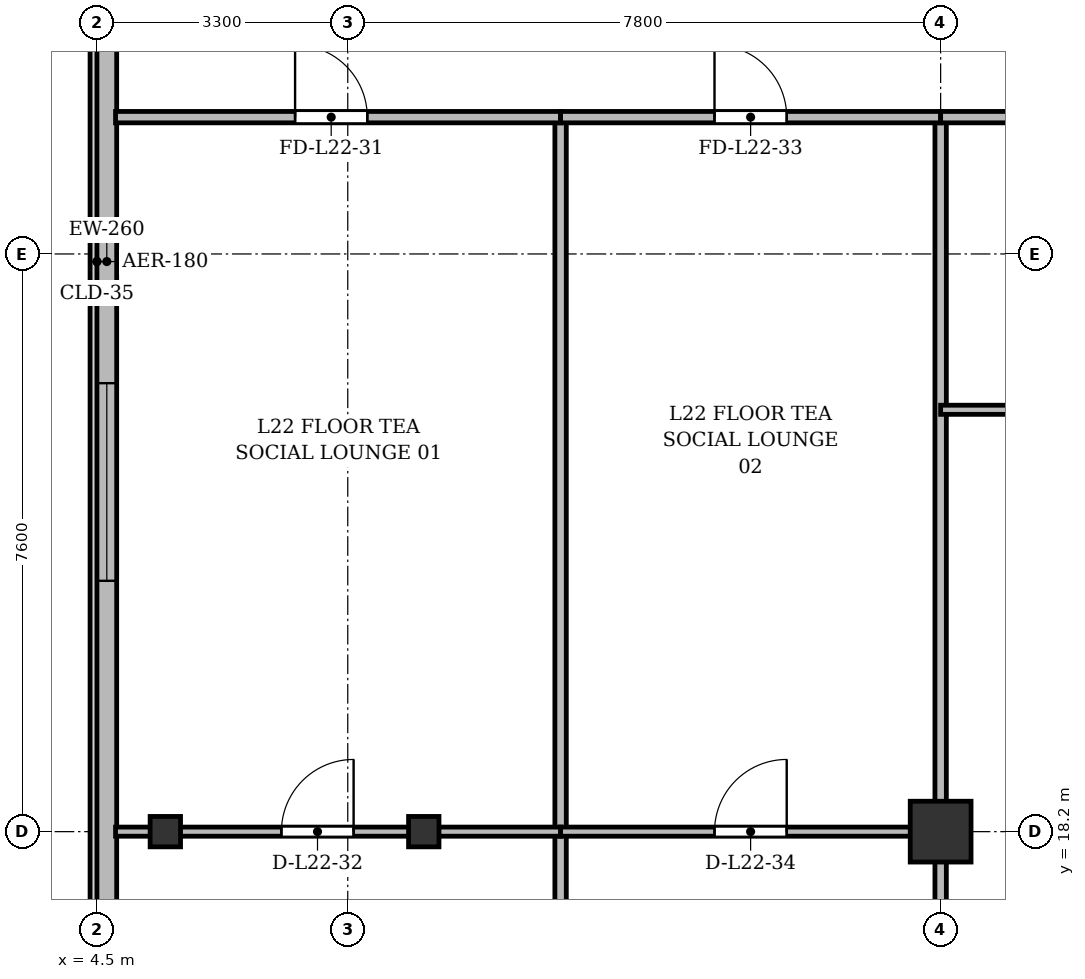
"""IFC4 building model, lengths in metres.
Left out: names, types, materials, properties, quantities, classifications, styles, units other than length and angle.
Written with IfcOpenShell. Run it as: python <this file> out.ifc"""

import sys

from ifc_helpers import new_model, si_unit, direction, frame, frame_2d, origin, origin_2d, place, context, subcontext, project, spatial, rectangle, i_section, extrude, source, transform, mapped, element, fill, save


model = new_model("IFC4")
c1 = context("Model", 3, precision=1e-05, world=origin(), true_north=direction((0.0, 1.0)))
c2 = subcontext(c1, "Body", "Model", "MODEL_VIEW")
j1 = project(units=[si_unit("LENGTHUNIT", "METRE"), si_unit("PLANEANGLEUNIT", "RADIAN")], contexts=[c1])
p1 = place(None, origin())
s1 = spatial("IfcSite", under=j1, at=p1, CompositionType="ELEMENT")
p2 = place(p1, origin())
s2 = spatial("IfcBuilding", under=s1, at=p2, CompositionType="ELEMENT")
p3 = place(p2, frame((0.0, 0.0, 88.9)))
s3 = spatial("IfcBuildingStorey", under=s2, at=p3, CompositionType="ELEMENT", Elevation=88.9)
m1 = source(origin(), c2, "Body", "SweptSolid", [
    extrude(i_section(OverallWidth=0.4, OverallDepth=0.4, WebThickness=0.022, FlangeThickness=0.035, at=origin_2d()), origin(), (0.0, 0.0, 1.0), 3.6),
])
for number, where, z_axis, x_axis in (
    (1, (5.4, 18.2, 0.0), (0.0, 0.0, 1.0), (1.0, 0.0, 0.0)),
    (2, (8.8, 18.2, 0.0), (0.0, 0.0, 1.0), (1.0, 0.0, 0.0)),
):
    element("IfcColumn", number, at=place(p3, frame(where, z_axis=z_axis, x_axis=x_axis)), inside=s3, PredefinedType="COLUMN", context=c2, shape_type="MappedRepresentation", body=[
        mapped(m1, transform((0.0, 0.0, 0.0), x_axis=(1.0, 0.0, 0.0), y_axis=(0.0, 1.0, 0.0), z_axis=(0.0, 0.0, 1.0), scale=1.0)),
    ])
m2 = source(origin(), c2, "Body", "SweptSolid", [
    extrude(rectangle(XDim=0.8, YDim=0.8, at=origin_2d()), origin(), (0.0, 0.0, 1.0), 3.6),
])
p4 = place(p3, frame((15.6, 18.2, 0.0), z_axis=(0.0, 0.0, 1.0), x_axis=(1.0, 0.0, 0.0)))
e3 = element("IfcColumn", 3, at=p4, inside=s3, PredefinedType="COLUMN", context=c2, shape_type="MappedRepresentation", body=[
    mapped(m2, transform((0.0, 0.0, 0.0), x_axis=(1.0, 0.0, 0.0), y_axis=(0.0, 1.0, 0.0), z_axis=(0.0, 0.0, 1.0), scale=1.0)),
])
p5 = place(p3, frame((4.63, 5.9, 0.0), z_axis=(0.0, 0.0, 1.0), x_axis=(0.0, 1.0, 0.0)))
e4 = element("IfcWall", 4, at=p5, inside=s3, PredefinedType="SOLIDWALL", context=c2, shape_type="SweptSolid", body=[
    extrude(rectangle(XDim=39.6, YDim=0.26, at=frame_2d((19.8, 0.0))), origin(), (0.0, 0.0, 1.0), 3.34),
])
p6 = place(p5, frame((1.45, 0.0, 0.92)))
e5 = element("IfcOpeningElement", 5, at=p6, cuts=e4, PredefinedType="OPENING", context=c2, shape_type="SweptSolid", body=[
    extrude(rectangle(XDim=1.2, YDim=1.65, at=frame_2d((0.6, 0.825))), frame((0.0, 0.14, 0.0), z_axis=(0.0, -1.0, 0.0), x_axis=(1.0, 0.0, 0.0)), (0.0, 0.0, 1.0), 0.28),
])
p7 = place(p5, frame((4.2, 0.0, 0.92)))
e6 = element("IfcOpeningElement", 6, at=p7, cuts=e4, PredefinedType="OPENING", context=c2, shape_type="SweptSolid", body=[
    extrude(rectangle(XDim=2.6, YDim=1.9, at=frame_2d((1.3, 0.95))), frame((0.0, 0.14, 0.0), z_axis=(0.0, -1.0, 0.0), x_axis=(1.0, 0.0, 0.0)), (0.0, 0.0, 1.0), 0.28),
])
p8 = place(p5, frame((8.4, 0.0, 0.92)))
e7 = element("IfcOpeningElement", 7, at=p8, cuts=e4, PredefinedType="OPENING", context=c2, shape_type="SweptSolid", body=[
    extrude(rectangle(XDim=2.6, YDim=1.9, at=frame_2d((1.3, 0.95))), frame((0.0, 0.14, 0.0), z_axis=(0.0, -1.0, 0.0), x_axis=(1.0, 0.0, 0.0)), (0.0, 0.0, 1.0), 0.28),
])
p9 = place(p5, frame((15.6, 0.0, 0.92)))
e8 = element("IfcOpeningElement", 8, at=p9, cuts=e4, PredefinedType="OPENING", context=c2, shape_type="SweptSolid", body=[
    extrude(rectangle(XDim=2.6, YDim=1.9, at=frame_2d((1.3, 0.95))), frame((0.0, 0.14, 0.0), z_axis=(0.0, -1.0, 0.0), x_axis=(1.0, 0.0, 0.0)), (0.0, 0.0, 1.0), 0.28),
])
p10 = place(p5, frame((29.6, 0.0, 0.92)))
e9 = element("IfcOpeningElement", 9, at=p10, cuts=e4, PredefinedType="OPENING", context=c2, shape_type="SweptSolid", body=[
    extrude(rectangle(XDim=2.6, YDim=1.9, at=frame_2d((1.3, 0.95))), frame((0.0, 0.14, 0.0), z_axis=(0.0, -1.0, 0.0), x_axis=(1.0, 0.0, 0.0)), (0.0, 0.0, 1.0), 0.28),
])
p11 = place(p5, frame((37.25, 0.0, 0.92)))
e10 = element("IfcOpeningElement", 10, at=p11, cuts=e4, PredefinedType="OPENING", context=c2, shape_type="SweptSolid", body=[
    extrude(rectangle(XDim=1.2, YDim=1.65, at=frame_2d((0.6, 0.825))), frame((0.0, 0.14, 0.0), z_axis=(0.0, -1.0, 0.0), x_axis=(1.0, 0.0, 0.0)), (0.0, 0.0, 1.0), 0.28),
])
p12 = place(p3, frame((10.6, 3.145, 0.0), z_axis=(0.0, 0.0, 1.0), x_axis=(0.0, 1.0, 0.0)))
e11 = element("IfcWall", 11, at=p12, inside=s3, PredefinedType="PARTITIONING", context=c2, shape_type="SweptSolid", body=[
    extrude(rectangle(XDim=24.455, YDim=0.15, at=frame_2d((12.228, 0.0))), origin(), (0.0, 0.0, 1.0), 2.752),
])
p13 = place(p3, frame((15.6, 3.145, 0.0), z_axis=(0.0, 0.0, 1.0), x_axis=(0.0, 1.0, 0.0)))
e12 = element("IfcWall", 12, at=p13, inside=s3, PredefinedType="PARTITIONING", context=c2, shape_type="SweptSolid", body=[
    extrude(rectangle(XDim=24.455, YDim=0.15, at=frame_2d((12.228, 0.0))), origin(), (0.0, 0.0, 1.0), 2.84),
])
p14 = place(p3, frame((4.745, 27.6, 0.0), z_axis=(0.0, 0.0, 1.0), x_axis=(1.0, 0.0, 0.0)))
e13 = element("IfcWall", 13, at=p14, inside=s3, PredefinedType="PARTITIONING", context=c2, shape_type="SweptSolid", body=[
    extrude(rectangle(XDim=5.855, YDim=0.15, at=frame_2d((2.927, 0.0))), origin(), (0.0, 0.0, 1.0), 2.84),
])
p15 = place(p14, frame((2.362, 0.0, 0.0)))
e14 = element("IfcOpeningElement", 14, at=p15, cuts=e13, PredefinedType="OPENING", context=c2, shape_type="SweptSolid", body=[
    extrude(rectangle(XDim=0.95, YDim=2.15, at=frame_2d((0.475, 1.075))), frame((0.0, 0.085, 0.0), z_axis=(0.0, -1.0, 0.0), x_axis=(1.0, 0.0, 0.0)), (0.0, 0.0, 1.0), 0.17),
])
p16 = place(p3, frame((4.745, 18.2, 0.0), z_axis=(0.0, 0.0, 1.0), x_axis=(1.0, 0.0, 0.0)))
e15 = element("IfcWall", 15, at=p16, inside=s3, PredefinedType="PARTITIONING", context=c2, shape_type="SweptSolid", body=[
    extrude(rectangle(XDim=5.855, YDim=0.12, at=frame_2d((2.927, 0.0))), origin(), (0.0, 0.0, 1.0), 2.752),
])
p17 = place(p16, frame((2.182, 0.0, 0.0)))
e16 = element("IfcOpeningElement", 16, at=p17, cuts=e15, PredefinedType="OPENING", context=c2, shape_type="SweptSolid", body=[
    extrude(rectangle(XDim=0.95, YDim=2.15, at=frame_2d((0.475, 1.075))), frame((0.0, 0.07, 0.0), z_axis=(0.0, -1.0, 0.0), x_axis=(1.0, 0.0, 0.0)), (0.0, 0.0, 1.0), 0.14),
])
p18 = place(p3, frame((10.6, 27.6, 0.0), z_axis=(0.0, 0.0, 1.0), x_axis=(1.0, 0.0, 0.0)))
e17 = element("IfcWall", 17, at=p18, inside=s3, PredefinedType="PARTITIONING", context=c2, shape_type="SweptSolid", body=[
    extrude(rectangle(XDim=5.0, YDim=0.15, at=frame_2d((2.5, 0.0))), origin(), (0.0, 0.0, 1.0), 2.84),
])
p19 = place(p18, frame((2.025, 0.0, 0.0)))
e18 = element("IfcOpeningElement", 18, at=p19, cuts=e17, PredefinedType="OPENING", context=c2, shape_type="SweptSolid", body=[
    extrude(rectangle(XDim=0.95, YDim=2.15, at=frame_2d((0.475, 1.075))), frame((0.0, 0.085, 0.0), z_axis=(0.0, -1.0, 0.0), x_axis=(1.0, 0.0, 0.0)), (0.0, 0.0, 1.0), 0.17),
])
p20 = place(p3, frame((10.6, 18.2, 0.0), z_axis=(0.0, 0.0, 1.0), x_axis=(1.0, 0.0, 0.0)))
e19 = element("IfcWall", 19, at=p20, inside=s3, PredefinedType="PARTITIONING", context=c2, shape_type="SweptSolid", body=[
    extrude(rectangle(XDim=5.0, YDim=0.12, at=frame_2d((2.5, 0.0))), origin(), (0.0, 0.0, 1.0), 2.752),
])
p21 = place(p20, frame((2.025, 0.0, 0.0)))
e20 = element("IfcOpeningElement", 20, at=p21, cuts=e19, PredefinedType="OPENING", context=c2, shape_type="SweptSolid", body=[
    extrude(rectangle(XDim=0.95, YDim=2.15, at=frame_2d((0.475, 1.075))), frame((0.0, 0.07, 0.0), z_axis=(0.0, -1.0, 0.0), x_axis=(1.0, 0.0, 0.0)), (0.0, 0.0, 1.0), 0.14),
])
p22 = place(p3, frame((15.6, 27.6, 0.0), z_axis=(0.0, 0.0, 1.0), x_axis=(1.0, 0.0, 0.0)))
e21 = element("IfcWall", 21, at=p22, inside=s3, PredefinedType="PARTITIONING", context=c2, shape_type="SweptSolid", body=[
    extrude(rectangle(XDim=7.8, YDim=0.15, at=frame_2d((3.9, 0.0))), origin(), (0.0, 0.0, 1.0), 2.84),
])
p23 = place(p22, frame((3.333, 0.0, 0.0)))
e22 = element("IfcOpeningElement", 22, at=p23, cuts=e21, PredefinedType="OPENING", context=c2, shape_type="SweptSolid", body=[
    extrude(rectangle(XDim=0.95, YDim=2.15, at=frame_2d((0.475, 1.075))), frame((0.0, 0.085, 0.0), z_axis=(0.0, -1.0, 0.0), x_axis=(1.0, 0.0, 0.0)), (0.0, 0.0, 1.0), 0.17),
])
p24 = place(p3, frame((15.6, 23.75, 0.0), z_axis=(0.0, 0.0, 1.0), x_axis=(1.0, 0.0, 0.0)))
e23 = element("IfcWall", 23, at=p24, inside=s3, PredefinedType="PARTITIONING", context=c2, shape_type="SweptSolid", body=[
    extrude(rectangle(XDim=7.8, YDim=0.12, at=frame_2d((3.9, 0.0))), origin(), (0.0, 0.0, 1.0), 2.84),
])
p25 = place(p24, frame((3.333, 0.0, 0.0)))
e24 = element("IfcOpeningElement", 24, at=p25, cuts=e23, PredefinedType="OPENING", context=c2, shape_type="SweptSolid", body=[
    extrude(rectangle(XDim=0.95, YDim=2.15, at=frame_2d((0.475, 1.075))), frame((0.0, 0.07, 0.0), z_axis=(0.0, -1.0, 0.0), x_axis=(1.0, 0.0, 0.0)), (0.0, 0.0, 1.0), 0.14),
])
m3 = source(origin(), c2, "Body", "SweptSolid", [
    extrude(rectangle(XDim=2.6, YDim=1.9, at=frame_2d((1.3, 0.95))), frame((0.0, 0.03, 0.0), z_axis=(0.0, -1.0, 0.0), x_axis=(1.0, 0.0, 0.0)), (0.0, 0.0, 1.0), 0.06),
])
p26 = place(p9, origin())
e25 = element("IfcWindow", 25, at=p26, inside=s3, PartitioningType="SINGLE_PANEL", PredefinedType="WINDOW", context=c2, shape_type="MappedRepresentation", body=[
    mapped(m3, transform((0.0, 0.0, 0.0), x_axis=(1.0, 0.0, 0.0), y_axis=(0.0, 1.0, 0.0), z_axis=(0.0, 0.0, 1.0), scale=1.0)),
])
fill(e8, e25)
m4 = source(origin(), c2, "Body", "SweptSolid", [
    extrude(rectangle(XDim=0.95, YDim=2.15, at=frame_2d((0.475, 1.075))), frame((0.0, 0.025, 0.0), z_axis=(0.0, -1.0, 0.0), x_axis=(1.0, 0.0, 0.0)), (0.0, 0.0, 1.0), 0.05),
])
p27 = place(p15, origin())
e26 = element("IfcDoor", 26, at=p27, inside=s3, OperationType="SINGLE_SWING_LEFT", PredefinedType="DOOR", context=c2, shape_type="MappedRepresentation", body=[
    mapped(m4, transform((0.0, 0.0, 0.0), x_axis=(1.0, 0.0, 0.0), y_axis=(0.0, 1.0, 0.0), z_axis=(0.0, 0.0, 1.0), scale=1.0)),
])
fill(e14, e26)
p28 = place(p17, origin())
e27 = element("IfcDoor", 27, at=p28, inside=s3, OperationType="SINGLE_SWING_RIGHT", PredefinedType="DOOR", context=c2, shape_type="MappedRepresentation", body=[
    mapped(m4, transform((0.0, 0.0, 0.0), x_axis=(1.0, 0.0, 0.0), y_axis=(0.0, 1.0, 0.0), z_axis=(0.0, 0.0, 1.0), scale=1.0)),
])
fill(e16, e27)
p29 = place(p19, origin())
e28 = element("IfcDoor", 28, at=p29, inside=s3, OperationType="SINGLE_SWING_LEFT", PredefinedType="DOOR", context=c2, shape_type="MappedRepresentation", body=[
    mapped(m4, transform((0.0, 0.0, 0.0), x_axis=(1.0, 0.0, 0.0), y_axis=(0.0, 1.0, 0.0), z_axis=(0.0, 0.0, 1.0), scale=1.0)),
])
fill(e18, e28)
p30 = place(p21, origin())
e29 = element("IfcDoor", 29, at=p30, inside=s3, OperationType="SINGLE_SWING_RIGHT", PredefinedType="DOOR", context=c2, shape_type="MappedRepresentation", body=[
    mapped(m4, transform((0.0, 0.0, 0.0), x_axis=(1.0, 0.0, 0.0), y_axis=(0.0, 1.0, 0.0), z_axis=(0.0, 0.0, 1.0), scale=1.0)),
])
fill(e20, e29)
save(model, sys.argv[1])
